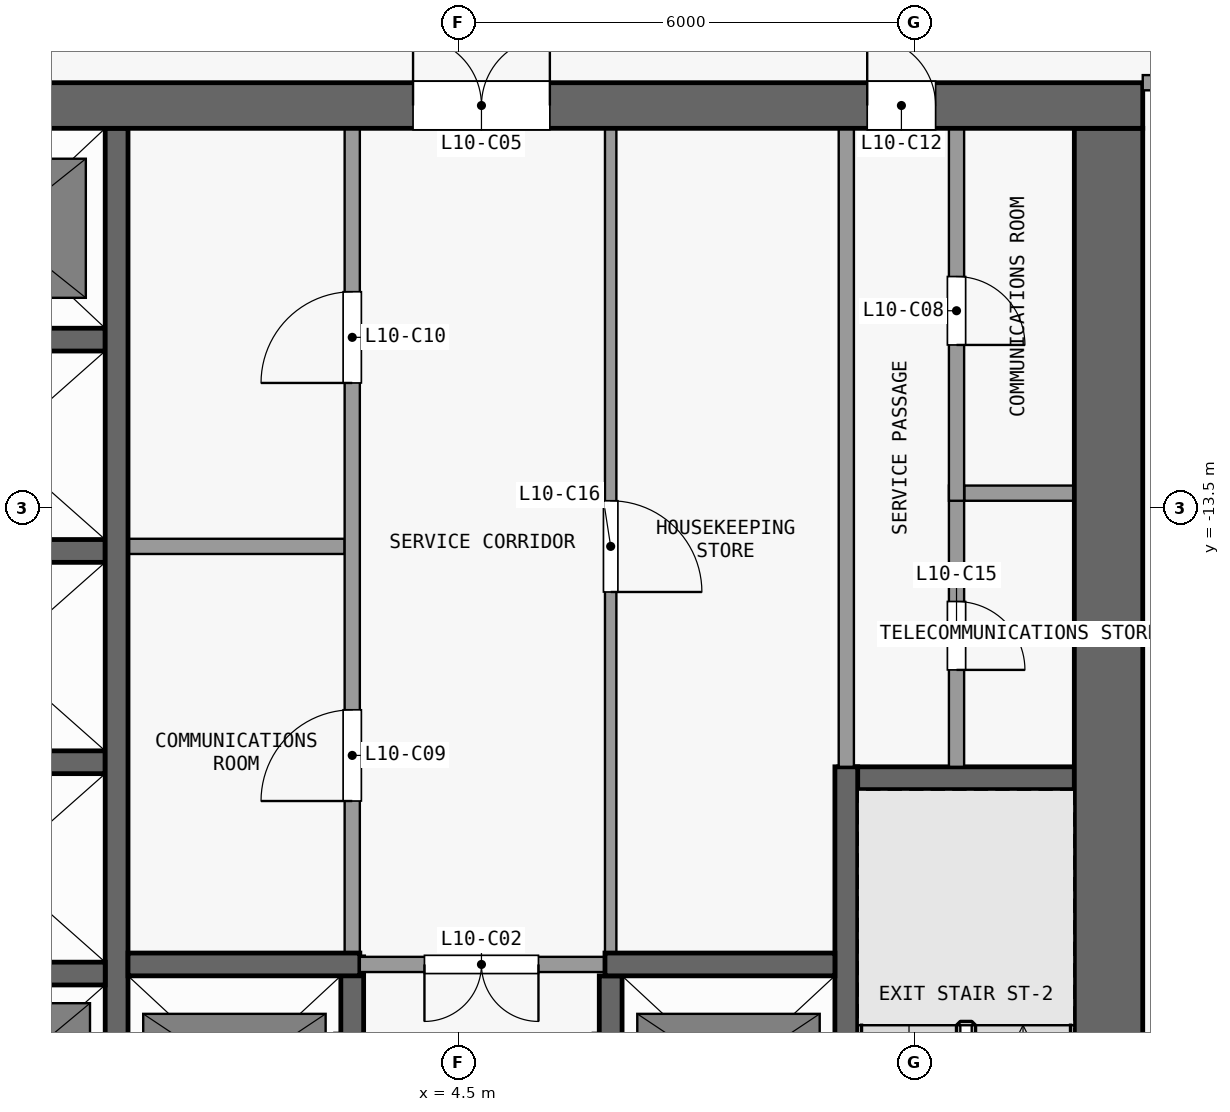
"""IFC4 building model, lengths in metres.
Left out: names, types, materials, properties, quantities, classifications, styles, units other than length and angle.
Written with IfcOpenShell. Run it as: python <this file> out.ifc"""

import sys

from ifc_helpers import new_model, si_unit, direction, frame, frame_2d, origin, place, context, subcontext, project, spatial, rectangle, extrude, element, fill, save


model = new_model("IFC4")
c1 = context("Model", 3, precision=1e-05, world=origin(), true_north=direction((0.0, 1.0)))
c2 = subcontext(c1, "Body", "Model", "MODEL_VIEW")
j1 = project(units=[si_unit("LENGTHUNIT", "METRE"), si_unit("PLANEANGLEUNIT", "RADIAN")], contexts=[c1])
p1 = place(None, origin())
s1 = spatial("IfcSite", under=j1, at=p1, CompositionType="ELEMENT")
p2 = place(p1, origin())
s2 = spatial("IfcBuilding", under=s1, at=p2, CompositionType="ELEMENT")
p3 = place(p2, frame((0.0, 0.0, 46.9)))
s3 = spatial("IfcBuildingStorey", under=s2, at=p3, CompositionType="ELEMENT", Elevation=46.9)
p4 = place(p3, frame((-13.5, -8.2, 0.0), z_axis=(0.0, 0.0, 1.0), x_axis=(1.0, 0.0, 0.0)))
e1 = element("IfcWall", 1, at=p4, inside=s3, PredefinedType="SHEAR", context=c2, shape_type="SweptSolid", body=[
    extrude(rectangle(XDim=27.0, YDim=0.6, at=frame_2d((13.5, 0.0))), origin(), (0.0, 0.0, 1.0), 3.3),
])
p5 = place(p4, frame((7.8, 0.0, 0.0)))
e2 = element("IfcOpeningElement", 2, at=p5, cuts=e1, PredefinedType="OPENING", context=c2, shape_type="SweptSolid", body=[
    extrude(rectangle(XDim=1.8, YDim=2.1, at=frame_2d((0.9, 1.05))), frame((0.0, 0.31, 0.0), z_axis=(0.0, -1.0, 0.0), x_axis=(1.0, 0.0, 0.0)), (0.0, 0.0, 1.0), 0.62),
])
p6 = place(p4, frame((17.4, 0.0, 0.0)))
e3 = element("IfcOpeningElement", 3, at=p6, cuts=e1, PredefinedType="OPENING", context=c2, shape_type="SweptSolid", body=[
    extrude(rectangle(XDim=1.8, YDim=2.1, at=frame_2d((0.9, 1.05))), frame((0.0, 0.31, 0.0), z_axis=(0.0, -1.0, 0.0), x_axis=(1.0, 0.0, 0.0)), (0.0, 0.0, 1.0), 0.62),
])
p7 = place(p4, frame((2.725, 0.0, 0.0)))
e4 = element("IfcOpeningElement", 4, at=p7, cuts=e1, PredefinedType="OPENING", context=c2, shape_type="SweptSolid", body=[
    extrude(rectangle(XDim=0.9, YDim=2.1, at=frame_2d((0.45, 1.05))), frame((0.0, 0.31, 0.0), z_axis=(0.0, -1.0, 0.0), x_axis=(1.0, 0.0, 0.0)), (0.0, 0.0, 1.0), 0.62),
])
p8 = place(p4, frame((23.375, 0.0, 0.0)))
e5 = element("IfcOpeningElement", 5, at=p8, cuts=e1, PredefinedType="OPENING", context=c2, shape_type="SweptSolid", body=[
    extrude(rectangle(XDim=0.9, YDim=2.1, at=frame_2d((0.45, 1.05))), frame((0.0, 0.31, 0.0), z_axis=(0.0, -1.0, 0.0), x_axis=(1.0, 0.0, 0.0)), (0.0, 0.0, 1.0), 0.62),
])
p9 = place(p3, frame((13.05, -24.6, 0.0), z_axis=(0.0, 0.0, 1.0), x_axis=(0.0, 1.0, 0.0)))
e6 = element("IfcWall", 6, at=p9, inside=s3, PredefinedType="SHEAR", context=c2, shape_type="SweptSolid", body=[
    extrude(rectangle(XDim=16.1, YDim=0.9, at=frame_2d((8.05, 0.0))), origin(), (0.0, 0.0, 1.0), 3.3),
])
p10 = place(p3, frame((-2.95, -19.62, 0.0), z_axis=(0.0, 0.0, 1.0), x_axis=(1.0, 0.0, 0.0)))
e7 = element("IfcWall", 7, at=p10, inside=s3, PredefinedType="SHEAR", context=c2, shape_type="SweptSolid", body=[
    extrude(rectangle(XDim=2.8, YDim=0.3, at=frame_2d((1.4, 0.0))), origin(), (0.0, 0.0, 1.0), 3.3),
])
p11 = place(p3, frame((0.15, -19.5, 0.0), z_axis=(0.0, 0.0, 1.0), x_axis=(1.0, 0.0, 0.0)))
e8 = element("IfcWall", 8, at=p11, inside=s3, PredefinedType="SHEAR", context=c2, shape_type="SweptSolid", body=[
    extrude(rectangle(XDim=3.05, YDim=0.3, at=frame_2d((1.525, 0.0))), origin(), (0.0, 0.0, 1.0), 3.3),
])
p12 = place(p3, frame((6.575, -19.5, 0.0), z_axis=(0.0, 0.0, 1.0), x_axis=(-1.0, 0.0, 0.0)))
e9 = element("IfcWall", 9, at=p12, inside=s3, PredefinedType="PARTITIONING", context=c2, shape_type="SweptSolid", body=[
    extrude(rectangle(XDim=3.375, YDim=0.2, at=frame_2d((1.688, 0.0))), origin(), (0.0, 0.0, 1.0), 3.3),
])
p13 = place(p12, frame((1.025, 0.0, 0.0)))
e10 = element("IfcOpeningElement", 10, at=p13, cuts=e9, PredefinedType="OPENING", context=c2, shape_type="SweptSolid", body=[
    extrude(rectangle(XDim=1.5, YDim=2.1, at=frame_2d((0.75, 1.05))), frame((0.0, 0.11, 0.0), z_axis=(0.0, -1.0, 0.0), x_axis=(1.0, 0.0, 0.0)), (0.0, 0.0, 1.0), 0.22),
])
p14 = place(p3, frame((6.425, -19.5, 0.0), z_axis=(0.0, 0.0, 1.0), x_axis=(1.0, 0.0, 0.0)))
e11 = element("IfcWall", 11, at=p14, inside=s3, PredefinedType="SHEAR", context=c2, shape_type="SweptSolid", body=[
    extrude(rectangle(XDim=3.025, YDim=0.3, at=frame_2d((1.512, 0.0))), origin(), (0.0, 0.0, 1.0), 3.3),
])
p15 = place(p3, frame((9.5, -17.05, 0.0), z_axis=(0.0, 0.0, 1.0), x_axis=(1.0, 0.0, 0.0)))
e12 = element("IfcWall", 12, at=p15, inside=s3, PredefinedType="SHEAR", context=c2, shape_type="SweptSolid", body=[
    extrude(rectangle(XDim=3.1, YDim=0.3, at=frame_2d((1.55, 0.0))), origin(), (0.0, 0.0, 1.0), 3.3),
])
for number, where, z_axis, x_axis in (
    (13, (-2.95, -16.84, 0.0), (0.0, 0.0, 1.0), (1.0, 0.0, 0.0)),
    (14, (-2.95, -14.06, 0.0), (0.0, 0.0, 1.0), (1.0, 0.0, 0.0)),
):
    element("IfcWall", number, at=place(p3, frame(where, z_axis=z_axis, x_axis=x_axis)), inside=s3, PredefinedType="SHEAR", context=c2, shape_type="SweptSolid", body=[
        extrude(rectangle(XDim=2.8, YDim=0.3, at=frame_2d((1.4, 0.0))), origin(), (0.0, 0.0, 1.0), 3.3),
    ])
p16 = place(p3, frame((0.15, -14.0, 0.0), z_axis=(0.0, 0.0, 1.0), x_axis=(1.0, 0.0, 0.0)))
e15 = element("IfcWall", 15, at=p16, inside=s3, PredefinedType="PARTITIONING", context=c2, shape_type="SweptSolid", body=[
    extrude(rectangle(XDim=2.85, YDim=0.2, at=frame_2d((1.425, 0.0))), origin(), (0.0, 0.0, 1.0), 3.3),
])
p17 = place(p3, frame((11.15, -13.3, 0.0), z_axis=(0.0, 0.0, 1.0), x_axis=(1.0, 0.0, 0.0)))
e16 = element("IfcWall", 16, at=p17, inside=s3, PredefinedType="PARTITIONING", context=c2, shape_type="SweptSolid", body=[
    extrude(rectangle(XDim=1.45, YDim=0.2, at=frame_2d((0.725, 0.0))), origin(), (0.0, 0.0, 1.0), 3.3),
])
p18 = place(p3, frame((-2.95, -11.28, 0.0), z_axis=(0.0, 0.0, 1.0), x_axis=(1.0, 0.0, 0.0)))
e17 = element("IfcWall", 17, at=p18, inside=s3, PredefinedType="SHEAR", context=c2, shape_type="SweptSolid", body=[
    extrude(rectangle(XDim=2.8, YDim=0.3, at=frame_2d((1.4, 0.0))), origin(), (0.0, 0.0, 1.0), 3.3),
])
p19 = place(p3, frame((0.0, -22.25, 0.0), z_axis=(0.0, 0.0, 1.0), x_axis=(0.0, 1.0, 0.0)))
e18 = element("IfcWall", 18, at=p19, inside=s3, PredefinedType="SHEAR", context=c2, shape_type="SweptSolid", body=[
    extrude(rectangle(XDim=13.75, YDim=0.3, at=frame_2d((6.875, 0.0))), origin(), (0.0, 0.0, 1.0), 3.3),
])
p20 = place(p3, frame((3.1, -22.25, 0.0), z_axis=(0.0, 0.0, 1.0), x_axis=(0.0, 1.0, 0.0)))
e19 = element("IfcWall", 19, at=p20, inside=s3, PredefinedType="SHEAR", context=c2, shape_type="SweptSolid", body=[
    extrude(rectangle(XDim=2.85, YDim=0.3, at=frame_2d((1.425, 0.0))), origin(), (0.0, 0.0, 1.0), 3.3),
])
p21 = place(p20, frame((0.75, 0.0, 0.0)))
e20 = element("IfcOpeningElement", 20, at=p21, cuts=e19, PredefinedType="OPENING", context=c2, shape_type="SweptSolid", body=[
    extrude(rectangle(XDim=1.1, YDim=2.1, at=frame_2d((0.55, 1.05))), frame((0.0, 0.16, 0.0), z_axis=(0.0, -1.0, 0.0), x_axis=(1.0, 0.0, 0.0)), (0.0, 0.0, 1.0), 0.32),
])
p22 = place(p3, frame((3.1, -19.6, 0.0), z_axis=(0.0, 0.0, 1.0), x_axis=(0.0, 1.0, 0.0)))
e21 = element("IfcWall", 21, at=p22, inside=s3, PredefinedType="PARTITIONING", context=c2, shape_type="SweptSolid", body=[
    extrude(rectangle(XDim=11.1, YDim=0.2, at=frame_2d((5.55, 0.0))), origin(), (0.0, 0.0, 1.0), 3.3),
])
p23 = place(p22, frame((2.25, 0.0, 0.0)))
e22 = element("IfcOpeningElement", 22, at=p23, cuts=e21, PredefinedType="OPENING", context=c2, shape_type="SweptSolid", body=[
    extrude(rectangle(XDim=1.2, YDim=2.1, at=frame_2d((0.6, 1.05))), frame((0.0, 0.11, 0.0), z_axis=(0.0, -1.0, 0.0), x_axis=(1.0, 0.0, 0.0)), (0.0, 0.0, 1.0), 0.22),
])
p24 = place(p22, frame((7.75, 0.0, 0.0)))
e23 = element("IfcOpeningElement", 23, at=p24, cuts=e21, PredefinedType="OPENING", context=c2, shape_type="SweptSolid", body=[
    extrude(rectangle(XDim=1.2, YDim=2.1, at=frame_2d((0.6, 1.05))), frame((0.0, 0.11, 0.0), z_axis=(0.0, -1.0, 0.0), x_axis=(1.0, 0.0, 0.0)), (0.0, 0.0, 1.0), 0.22),
])
p25 = place(p3, frame((6.5, -22.25, 0.0), z_axis=(0.0, 0.0, 1.0), x_axis=(0.0, 1.0, 0.0)))
e24 = element("IfcWall", 24, at=p25, inside=s3, PredefinedType="SHEAR", context=c2, shape_type="SweptSolid", body=[
    extrude(rectangle(XDim=2.6, YDim=0.3, at=frame_2d((1.3, 0.0))), origin(), (0.0, 0.0, 1.0), 3.3),
])
p26 = place(p25, frame((0.75, 0.0, 0.0)))
e25 = element("IfcOpeningElement", 25, at=p26, cuts=e24, PredefinedType="OPENING", context=c2, shape_type="SweptSolid", body=[
    extrude(rectangle(XDim=1.1, YDim=2.1, at=frame_2d((0.55, 1.05))), frame((0.0, 0.16, 0.0), z_axis=(0.0, -1.0, 0.0), x_axis=(1.0, 0.0, 0.0)), (0.0, 0.0, 1.0), 0.32),
])
p27 = place(p3, frame((6.5, -8.5, 0.0), z_axis=(0.0, 0.0, 1.0), x_axis=(0.0, -1.0, 0.0)))
e26 = element("IfcWall", 26, at=p27, inside=s3, PredefinedType="PARTITIONING", context=c2, shape_type="SweptSolid", body=[
    extrude(rectangle(XDim=10.85, YDim=0.15, at=frame_2d((5.425, 0.0))), origin(), (0.0, 0.0, 1.0), 3.3),
])
p28 = place(p27, frame((4.9, 0.0, 0.0)))
e27 = element("IfcOpeningElement", 27, at=p28, cuts=e26, PredefinedType="OPENING", context=c2, shape_type="SweptSolid", body=[
    extrude(rectangle(XDim=1.2, YDim=2.1, at=frame_2d((0.6, 1.05))), frame((0.0, 0.085, 0.0), z_axis=(0.0, -1.0, 0.0), x_axis=(1.0, 0.0, 0.0)), (0.0, 0.0, 1.0), 0.17),
])
p29 = place(p3, frame((9.6, -16.9, 0.0), z_axis=(0.0, 0.0, 1.0), x_axis=(0.0, -1.0, 0.0)))
e28 = element("IfcWall", 28, at=p29, inside=s3, PredefinedType="SHEAR", context=c2, shape_type="SweptSolid", body=[
    extrude(rectangle(XDim=7.7, YDim=0.3, at=frame_2d((3.85, 0.0))), origin(), (0.0, 0.0, 1.0), 3.3),
])
p30 = place(p29, frame((6.5, 0.0, 0.0)))
e29 = element("IfcOpeningElement", 29, at=p30, cuts=e28, PredefinedType="OPENING", context=c2, shape_type="SweptSolid", body=[
    extrude(rectangle(XDim=1.1, YDim=2.1, at=frame_2d((0.55, 1.05))), frame((0.0, 0.16, 0.0), z_axis=(0.0, -1.0, 0.0), x_axis=(1.0, 0.0, 0.0)), (0.0, 0.0, 1.0), 0.32),
])
p31 = place(p3, frame((9.6, -16.9, 0.0), z_axis=(0.0, 0.0, 1.0), x_axis=(0.0, 1.0, 0.0)))
e30 = element("IfcWall", 30, at=p31, inside=s3, PredefinedType="PARTITIONING", context=c2, shape_type="SweptSolid", body=[
    extrude(rectangle(XDim=8.4, YDim=0.2, at=frame_2d((4.2, 0.0))), origin(), (0.0, 0.0, 1.0), 3.3),
])
p32 = place(p3, frame((11.05, -13.2, 0.0), z_axis=(0.0, 0.0, 1.0), x_axis=(0.0, -1.0, 0.0)))
e31 = element("IfcWall", 31, at=p32, inside=s3, PredefinedType="PARTITIONING", context=c2, shape_type="SweptSolid", body=[
    extrude(rectangle(XDim=3.7, YDim=0.2, at=frame_2d((1.85, 0.0))), origin(), (0.0, 0.0, 1.0), 3.3),
])
p33 = place(p32, frame((1.525, 0.0, 0.0)))
e32 = element("IfcOpeningElement", 32, at=p33, cuts=e31, PredefinedType="OPENING", context=c2, shape_type="SweptSolid", body=[
    extrude(rectangle(XDim=0.9, YDim=2.1, at=frame_2d((0.45, 1.05))), frame((0.0, 0.11, 0.0), z_axis=(0.0, -1.0, 0.0), x_axis=(1.0, 0.0, 0.0)), (0.0, 0.0, 1.0), 0.22),
])
p34 = place(p3, frame((11.05, -8.5, 0.0), z_axis=(0.0, 0.0, 1.0), x_axis=(0.0, -1.0, 0.0)))
e33 = element("IfcWall", 33, at=p34, inside=s3, PredefinedType="PARTITIONING", context=c2, shape_type="SweptSolid", body=[
    extrude(rectangle(XDim=4.9, YDim=0.2, at=frame_2d((2.45, 0.0))), origin(), (0.0, 0.0, 1.0), 3.3),
])
p35 = place(p34, frame((1.95, 0.0, 0.0)))
e34 = element("IfcOpeningElement", 34, at=p35, cuts=e33, PredefinedType="OPENING", context=c2, shape_type="SweptSolid", body=[
    extrude(rectangle(XDim=0.9, YDim=2.1, at=frame_2d((0.45, 1.05))), frame((0.0, 0.11, 0.0), z_axis=(0.0, -1.0, 0.0), x_axis=(1.0, 0.0, 0.0)), (0.0, 0.0, 1.0), 0.22),
])
p36 = place(p3, frame((13.5, -7.9, 0.0), z_axis=(0.0, 0.0, 1.0), x_axis=(1.0, 0.0, 0.0)))
e35 = element("IfcWall", 35, at=p36, inside=s3, PredefinedType="PARTITIONING", context=c2, shape_type="SweptSolid", body=[
    extrude(rectangle(XDim=12.65, YDim=0.2, at=frame_2d((6.325, 0.0))), origin(), (0.0, 0.0, 1.0), 3.3),
])
p37 = place(p36, frame((1.0, 0.0, 0.0)))
e36 = element("IfcOpeningElement", 36, at=p37, cuts=e35, PredefinedType="OPENING", context=c2, shape_type="SweptSolid", body=[
    extrude(rectangle(XDim=1.0, YDim=2.1, at=frame_2d((0.5, 1.05))), frame((0.0, 0.11, 0.0), z_axis=(0.0, -1.0, 0.0), x_axis=(1.0, 0.0, 0.0)), (0.0, 0.0, 1.0), 0.22),
])
p38 = place(p13, origin())
e37 = element("IfcDoor", 37, at=p38, inside=s3, OperationType="DOUBLE_DOOR_SINGLE_SWING", PredefinedType="DOOR", context=c2, shape_type="SweptSolid", body=[
    extrude(rectangle(XDim=1.5, YDim=2.1, at=frame_2d((0.75, 1.05))), frame((0.0, 0.025, 0.0), z_axis=(0.0, -1.0, 0.0), x_axis=(1.0, 0.0, 0.0)), (0.0, 0.0, 1.0), 0.05),
])
fill(e10, e37)
p39 = place(p6, origin())
e38 = element("IfcDoor", 38, at=p39, inside=s3, OperationType="DOUBLE_DOOR_SINGLE_SWING", PredefinedType="DOOR", context=c2, shape_type="SweptSolid", body=[
    extrude(rectangle(XDim=1.8, YDim=2.1, at=frame_2d((0.9, 1.05))), frame((0.0, 0.025, 0.0), z_axis=(0.0, -1.0, 0.0), x_axis=(1.0, 0.0, 0.0)), (0.0, 0.0, 1.0), 0.05),
])
fill(e3, e38)
p40 = place(p35, origin())
e39 = element("IfcDoor", 39, at=p40, inside=s3, OperationType="SINGLE_SWING_RIGHT", PredefinedType="DOOR", context=c2, shape_type="SweptSolid", body=[
    extrude(rectangle(XDim=0.9, YDim=2.1, at=frame_2d((0.45, 1.05))), frame((0.0, 0.025, 0.0), z_axis=(0.0, -1.0, 0.0), x_axis=(1.0, 0.0, 0.0)), (0.0, 0.0, 1.0), 0.05),
])
fill(e34, e39)
p41 = place(p23, origin())
e40 = element("IfcDoor", 40, at=p41, inside=s3, OperationType="SINGLE_SWING_LEFT", PredefinedType="DOOR", context=c2, shape_type="SweptSolid", body=[
    extrude(rectangle(XDim=1.2, YDim=2.1, at=frame_2d((0.6, 1.05))), frame((0.0, 0.025, 0.0), z_axis=(0.0, -1.0, 0.0), x_axis=(1.0, 0.0, 0.0)), (0.0, 0.0, 1.0), 0.05),
])
fill(e22, e40)
p42 = place(p24, origin())
e41 = element("IfcDoor", 41, at=p42, inside=s3, OperationType="SINGLE_SWING_LEFT", PredefinedType="DOOR", context=c2, shape_type="SweptSolid", body=[
    extrude(rectangle(XDim=1.2, YDim=2.1, at=frame_2d((0.6, 1.05))), frame((0.0, 0.025, 0.0), z_axis=(0.0, -1.0, 0.0), x_axis=(1.0, 0.0, 0.0)), (0.0, 0.0, 1.0), 0.05),
])
fill(e23, e41)
p43 = place(p8, origin())
e42 = element("IfcDoor", 42, at=p43, inside=s3, OperationType="SINGLE_SWING_LEFT", PredefinedType="DOOR", context=c2, shape_type="SweptSolid", body=[
    extrude(rectangle(XDim=0.9, YDim=2.1, at=frame_2d((0.45, 1.05))), frame((0.0, 0.025, 0.0), z_axis=(0.0, -1.0, 0.0), x_axis=(1.0, 0.0, 0.0)), (0.0, 0.0, 1.0), 0.05),
])
fill(e5, e42)
p44 = place(p33, origin())
e43 = element("IfcDoor", 43, at=p44, inside=s3, OperationType="SINGLE_SWING_RIGHT", PredefinedType="DOOR", context=c2, shape_type="SweptSolid", body=[
    extrude(rectangle(XDim=0.9, YDim=2.1, at=frame_2d((0.45, 1.05))), frame((0.0, 0.025, 0.0), z_axis=(0.0, -1.0, 0.0), x_axis=(1.0, 0.0, 0.0)), (0.0, 0.0, 1.0), 0.05),
])
fill(e32, e43)
p45 = place(p28, origin())
e44 = element("IfcDoor", 44, at=p45, inside=s3, OperationType="SINGLE_SWING_RIGHT", PredefinedType="DOOR", context=c2, shape_type="SweptSolid", body=[
    extrude(rectangle(XDim=1.2, YDim=2.1, at=frame_2d((0.6, 1.05))), frame((0.0, 0.025, 0.0), z_axis=(0.0, -1.0, 0.0), x_axis=(1.0, 0.0, 0.0)), (0.0, 0.0, 1.0), 0.05),
])
fill(e27, e44)
save(model, sys.argv[1])
